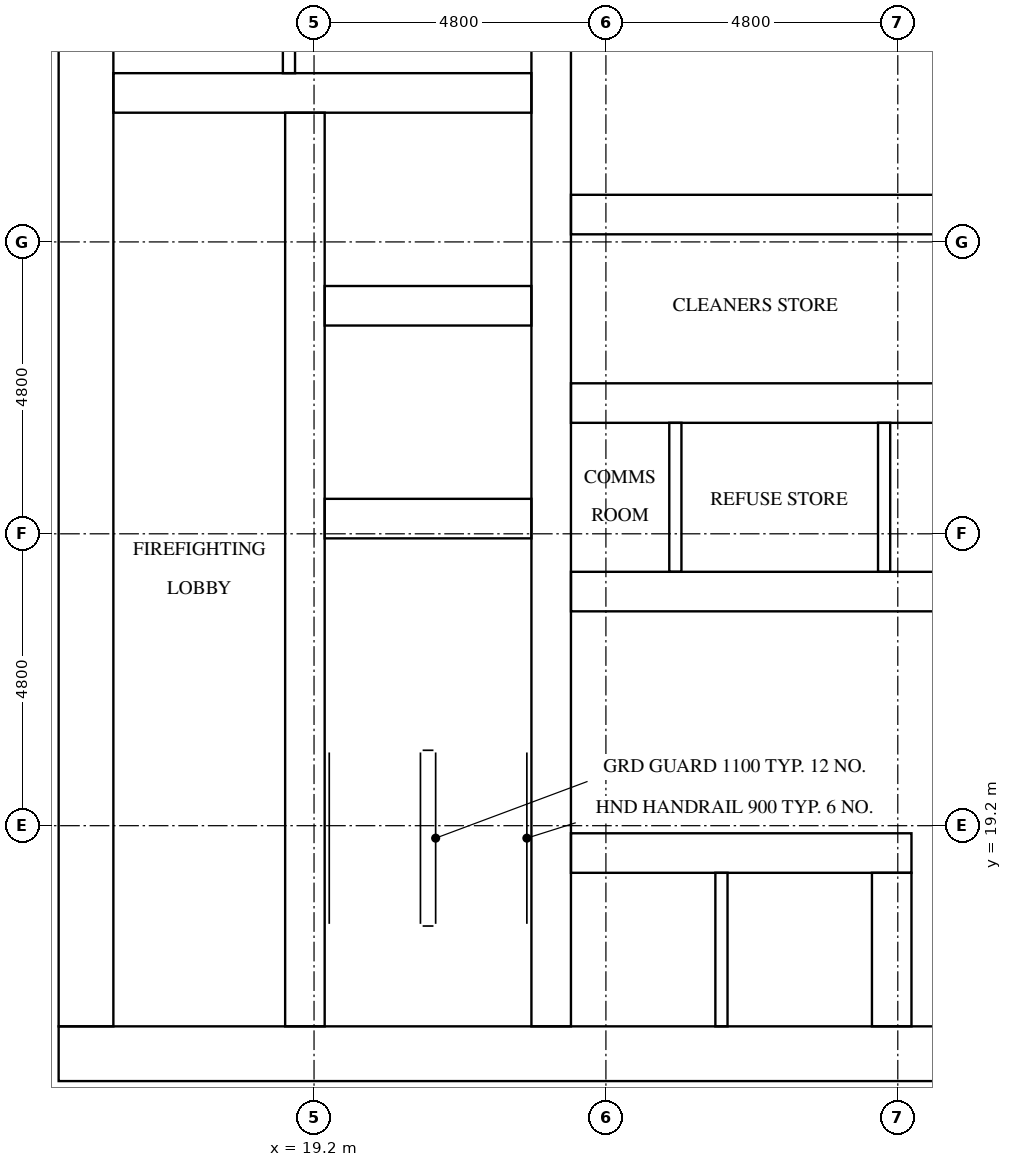
"""IFC4 building model, lengths in metres.
Left out: names, types, materials, properties, quantities, classifications, styles, units other than length and angle.
Written with IfcOpenShell. Run it as: python <this file> out.ifc"""

import sys

from ifc_helpers import new_model, si_unit, direction, frame, frame_2d, origin, place, context, subcontext, project, spatial, rectangle, extrude, element, fill, save


model = new_model("IFC4")
c1 = context("Model", 3, precision=1e-05, world=origin(), true_north=direction((0.0, 1.0)))
c2 = subcontext(c1, "Body", "Model", "MODEL_VIEW")
j1 = project(units=[si_unit("LENGTHUNIT", "METRE"), si_unit("PLANEANGLEUNIT", "RADIAN")], contexts=[c1])
p1 = place(None, origin())
s1 = spatial("IfcSite", under=j1, at=p1, CompositionType="ELEMENT")
p2 = place(p1, origin())
s2 = spatial("IfcBuilding", under=s1, at=p2, CompositionType="ELEMENT")
p3 = place(p2, frame((0.0, 0.0, 89.2)))
s3 = spatial("IfcBuildingStorey", under=s2, at=p3, CompositionType="ELEMENT", Elevation=89.2)
p4 = place(p3, frame((15.0, 15.45, 0.0), z_axis=(0.0, 0.0, 1.0), x_axis=(1.0, 0.0, 0.0)))
e1 = element("IfcWall", 1, at=p4, inside=s3, PredefinedType="SHEAR", context=c2, shape_type="SweptSolid", body=[
    extrude(rectangle(XDim=32.4, YDim=0.9, at=frame_2d((16.2, 0.0))), origin(), (0.0, 0.0, 1.0), 3.2),
])
p5 = place(p4, frame((15.3, 0.0, 0.0)))
e2 = element("IfcOpeningElement", 2, at=p5, cuts=e1, PredefinedType="OPENING", context=c2, shape_type="SweptSolid", body=[
    extrude(rectangle(XDim=1.8, YDim=2.1, at=frame_2d((0.9, 1.05))), frame((0.0, 0.46, 0.0), z_axis=(0.0, -1.0, 0.0), x_axis=(1.0, 0.0, 0.0)), (0.0, 0.0, 1.0), 0.92),
])
p6 = place(p3, frame((15.45, 15.9, 0.0), z_axis=(0.0, 0.0, 1.0), x_axis=(0.0, 1.0, 0.0)))
e3 = element("IfcWall", 3, at=p6, inside=s3, PredefinedType="SHEAR", context=c2, shape_type="SweptSolid", body=[
    extrude(rectangle(XDim=21.0, YDim=0.9, at=frame_2d((10.5, 0.0))), origin(), (0.0, 0.0, 1.0), 3.2),
])
p7 = place(p6, frame((4.86, 0.0, 0.0)))
e4 = element("IfcOpeningElement", 4, at=p7, cuts=e3, PredefinedType="OPENING", context=c2, shape_type="SweptSolid", body=[
    extrude(rectangle(XDim=1.2, YDim=2.1, at=frame_2d((0.6, 1.05))), frame((0.0, 0.46, 0.0), z_axis=(0.0, -1.0, 0.0), x_axis=(1.0, 0.0, 0.0)), (0.0, 0.0, 1.0), 0.92),
])
p8 = place(p3, frame((19.05, 15.9, 0.0), z_axis=(0.0, 0.0, 1.0), x_axis=(0.0, 1.0, 0.0)))
e5 = element("IfcWall", 5, at=p8, inside=s3, PredefinedType="SHEAR", context=c2, shape_type="SweptSolid", body=[
    extrude(rectangle(XDim=15.025, YDim=0.65, at=frame_2d((7.513, 0.0))), origin(), (0.0, 0.0, 1.0), 3.2),
])
p9 = place(p8, frame((9.55, 0.0, 0.0)))
e6 = element("IfcOpeningElement", 6, at=p9, cuts=e5, PredefinedType="OPENING", context=c2, shape_type="SweptSolid", body=[
    extrude(rectangle(XDim=1.1, YDim=2.1, at=frame_2d((0.55, 1.05))), frame((0.0, 0.335, 0.0), z_axis=(0.0, -1.0, 0.0), x_axis=(1.0, 0.0, 0.0)), (0.0, 0.0, 1.0), 0.67),
])
p10 = place(p8, frame((13.05, 0.0, 0.0)))
e7 = element("IfcOpeningElement", 7, at=p10, cuts=e5, PredefinedType="OPENING", context=c2, shape_type="SweptSolid", body=[
    extrude(rectangle(XDim=1.1, YDim=2.1, at=frame_2d((0.55, 1.05))), frame((0.0, 0.335, 0.0), z_axis=(0.0, -1.0, 0.0), x_axis=(1.0, 0.0, 0.0)), (0.0, 0.0, 1.0), 0.67),
])
p11 = place(p8, frame((0.3, 0.0, 0.0)))
e8 = element("IfcOpeningElement", 8, at=p11, cuts=e5, PredefinedType="OPENING", context=c2, shape_type="SweptSolid", body=[
    extrude(rectangle(XDim=1.2, YDim=2.1, at=frame_2d((0.6, 1.05))), frame((0.0, 0.335, 0.0), z_axis=(0.0, -1.0, 0.0), x_axis=(1.0, 0.0, 0.0)), (0.0, 0.0, 1.0), 0.67),
])
p12 = place(p3, frame((23.1, 15.9, 0.0), z_axis=(0.0, 0.0, 1.0), x_axis=(0.0, 1.0, 0.0)))
e9 = element("IfcWall", 9, at=p12, inside=s3, PredefinedType="SHEAR", context=c2, shape_type="SweptSolid", body=[
    extrude(rectangle(XDim=21.0, YDim=0.65, at=frame_2d((10.5, 0.0))), origin(), (0.0, 0.0, 1.0), 3.2),
])
for number, where, z_axis, x_axis in (
    (10, (19.375, 24.25, 0.0), (0.0, 0.0, 1.0), (1.0, 0.0, 0.0)),
    (11, (19.375, 27.75, 0.0), (0.0, 0.0, 1.0), (1.0, 0.0, 0.0)),
):
    element("IfcWall", number, at=place(p3, frame(where, z_axis=z_axis, x_axis=x_axis)), inside=s3, PredefinedType="SHEAR", context=c2, shape_type="SweptSolid", body=[
        extrude(rectangle(XDim=3.4, YDim=0.65, at=frame_2d((1.7, 0.0))), origin(), (0.0, 0.0, 1.0), 3.2),
    ])
p13 = place(p3, frame((15.9, 31.25, 0.0), z_axis=(0.0, 0.0, 1.0), x_axis=(1.0, 0.0, 0.0)))
e12 = element("IfcWall", 12, at=p13, inside=s3, PredefinedType="SHEAR", context=c2, shape_type="SweptSolid", body=[
    extrude(rectangle(XDim=6.875, YDim=0.65, at=frame_2d((3.438, 0.0))), origin(), (0.0, 0.0, 1.0), 3.2),
])
p14 = place(p3, frame((23.425, 18.75, 0.0), z_axis=(0.0, 0.0, 1.0), x_axis=(1.0, 0.0, 0.0)))
e13 = element("IfcWall", 13, at=p14, inside=s3, PredefinedType="SHEAR", context=c2, shape_type="SweptSolid", body=[
    extrude(rectangle(XDim=5.6, YDim=0.65, at=frame_2d((2.8, 0.0))), origin(), (0.0, 0.0, 1.0), 3.2),
])
p15 = place(p14, frame((0.637, 0.0, 0.0)))
e14 = element("IfcOpeningElement", 14, at=p15, cuts=e13, PredefinedType="OPENING", context=c2, shape_type="SweptSolid", body=[
    extrude(rectangle(XDim=1.1, YDim=2.1, at=frame_2d((0.55, 1.05))), frame((0.0, 0.335, 0.0), z_axis=(0.0, -1.0, 0.0), x_axis=(1.0, 0.0, 0.0)), (0.0, 0.0, 1.0), 0.67),
])
p16 = place(p14, frame((3.212, 0.0, 0.0)))
e15 = element("IfcOpeningElement", 15, at=p16, cuts=e13, PredefinedType="OPENING", context=c2, shape_type="SweptSolid", body=[
    extrude(rectangle(XDim=1.1, YDim=2.1, at=frame_2d((0.55, 1.05))), frame((0.0, 0.335, 0.0), z_axis=(0.0, -1.0, 0.0), x_axis=(1.0, 0.0, 0.0)), (0.0, 0.0, 1.0), 0.67),
])
p17 = place(p3, frame((23.425, 23.05, 0.0), z_axis=(0.0, 0.0, 1.0), x_axis=(1.0, 0.0, 0.0)))
e16 = element("IfcWall", 16, at=p17, inside=s3, PredefinedType="SHEAR", context=c2, shape_type="SweptSolid", body=[
    extrude(rectangle(XDim=15.55, YDim=0.65, at=frame_2d((7.775, 0.0))), origin(), (0.0, 0.0, 1.0), 3.2),
])
p18 = place(p17, frame((0.309, 0.0, 0.0)))
e17 = element("IfcOpeningElement", 17, at=p18, cuts=e16, PredefinedType="OPENING", context=c2, shape_type="SweptSolid", body=[
    extrude(rectangle(XDim=1.0, YDim=2.1, at=frame_2d((0.5, 1.05))), frame((0.0, 0.335, 0.0), z_axis=(0.0, -1.0, 0.0), x_axis=(1.0, 0.0, 0.0)), (0.0, 0.0, 1.0), 0.67),
])
p19 = place(p17, frame((2.934, 0.0, 0.0)))
e18 = element("IfcOpeningElement", 18, at=p19, cuts=e16, PredefinedType="OPENING", context=c2, shape_type="SweptSolid", body=[
    extrude(rectangle(XDim=1.0, YDim=2.1, at=frame_2d((0.5, 1.05))), frame((0.0, 0.335, 0.0), z_axis=(0.0, -1.0, 0.0), x_axis=(1.0, 0.0, 0.0)), (0.0, 0.0, 1.0), 0.67),
])
p20 = place(p17, frame((10.809, 0.0, 0.0)))
e19 = element("IfcOpeningElement", 19, at=p20, cuts=e16, PredefinedType="OPENING", context=c2, shape_type="SweptSolid", body=[
    extrude(rectangle(XDim=1.0, YDim=2.1, at=frame_2d((0.5, 1.05))), frame((0.0, 0.335, 0.0), z_axis=(0.0, -1.0, 0.0), x_axis=(1.0, 0.0, 0.0)), (0.0, 0.0, 1.0), 0.67),
])
p21 = place(p17, frame((13.434, 0.0, 0.0)))
e20 = element("IfcOpeningElement", 20, at=p21, cuts=e16, PredefinedType="OPENING", context=c2, shape_type="SweptSolid", body=[
    extrude(rectangle(XDim=1.0, YDim=2.1, at=frame_2d((0.5, 1.05))), frame((0.0, 0.335, 0.0), z_axis=(0.0, -1.0, 0.0), x_axis=(1.0, 0.0, 0.0)), (0.0, 0.0, 1.0), 0.67),
])
p22 = place(p3, frame((23.425, 26.15, 0.0), z_axis=(0.0, 0.0, 1.0), x_axis=(1.0, 0.0, 0.0)))
e21 = element("IfcWall", 21, at=p22, inside=s3, PredefinedType="SHEAR", context=c2, shape_type="SweptSolid", body=[
    extrude(rectangle(XDim=15.55, YDim=0.65, at=frame_2d((7.775, 0.0))), origin(), (0.0, 0.0, 1.0), 3.2),
])
p23 = place(p3, frame((23.425, 29.25, 0.0), z_axis=(0.0, 0.0, 1.0), x_axis=(1.0, 0.0, 0.0)))
e22 = element("IfcWall", 22, at=p23, inside=s3, PredefinedType="SHEAR", context=c2, shape_type="SweptSolid", body=[
    extrude(rectangle(XDim=15.55, YDim=0.65, at=frame_2d((7.775, 0.0))), origin(), (0.0, 0.0, 1.0), 3.2),
])
p24 = place(p23, frame((2.508, 0.0, 0.0)))
e23 = element("IfcOpeningElement", 23, at=p24, cuts=e22, PredefinedType="OPENING", context=c2, shape_type="SweptSolid", body=[
    extrude(rectangle(XDim=1.0, YDim=2.1, at=frame_2d((0.5, 1.05))), frame((0.0, 0.335, 0.0), z_axis=(0.0, -1.0, 0.0), x_axis=(1.0, 0.0, 0.0)), (0.0, 0.0, 1.0), 0.67),
])
p25 = place(p23, frame((7.275, 0.0, 0.0)))
e24 = element("IfcOpeningElement", 24, at=p25, cuts=e22, PredefinedType="OPENING", context=c2, shape_type="SweptSolid", body=[
    extrude(rectangle(XDim=1.0, YDim=2.1, at=frame_2d((0.5, 1.05))), frame((0.0, 0.335, 0.0), z_axis=(0.0, -1.0, 0.0), x_axis=(1.0, 0.0, 0.0)), (0.0, 0.0, 1.0), 0.67),
])
p26 = place(p23, frame((12.042, 0.0, 0.0)))
e25 = element("IfcOpeningElement", 25, at=p26, cuts=e22, PredefinedType="OPENING", context=c2, shape_type="SweptSolid", body=[
    extrude(rectangle(XDim=1.0, YDim=2.1, at=frame_2d((0.5, 1.05))), frame((0.0, 0.335, 0.0), z_axis=(0.0, -1.0, 0.0), x_axis=(1.0, 0.0, 0.0)), (0.0, 0.0, 1.0), 0.67),
])
p27 = place(p3, frame((28.7, 15.9, 0.0), z_axis=(0.0, 0.0, 1.0), x_axis=(0.0, 1.0, 0.0)))
e26 = element("IfcWall", 26, at=p27, inside=s3, PredefinedType="SHEAR", context=c2, shape_type="SweptSolid", body=[
    extrude(rectangle(XDim=2.525, YDim=0.65, at=frame_2d((1.263, 0.0))), origin(), (0.0, 0.0, 1.0), 3.2),
])
p28 = place(p3, frame((28.575, 23.375, 0.0), z_axis=(0.0, 0.0, 1.0), x_axis=(0.0, 1.0, 0.0)))
e27 = element("IfcWall", 27, at=p28, inside=s3, PredefinedType="SOLIDWALL", context=c2, shape_type="SweptSolid", body=[
    extrude(rectangle(XDim=2.45, YDim=0.2, at=frame_2d((1.225, 0.0))), origin(), (0.0, 0.0, 1.0), 3.2),
])
p29 = place(p3, frame((25.9, 15.9, 0.0), z_axis=(0.0, 0.0, 1.0), x_axis=(0.0, 1.0, 0.0)))
e28 = element("IfcWall", 28, at=p29, inside=s3, PredefinedType="SOLIDWALL", context=c2, shape_type="SweptSolid", body=[
    extrude(rectangle(XDim=2.525, YDim=0.2, at=frame_2d((1.263, 0.0))), origin(), (0.0, 0.0, 1.0), 3.2),
])
p30 = place(p3, frame((18.788, 31.575, 0.0), z_axis=(0.0, 0.0, 1.0), x_axis=(0.0, 1.0, 0.0)))
e29 = element("IfcWall", 29, at=p30, inside=s3, PredefinedType="PARTITIONING", context=c2, shape_type="SweptSolid", body=[
    extrude(rectangle(XDim=5.325, YDim=0.2, at=frame_2d((2.663, 0.0))), origin(), (0.0, 0.0, 1.0), 3.2),
])
p31 = place(p3, frame((25.142, 23.375, 0.0), z_axis=(0.0, 0.0, 1.0), x_axis=(0.0, 1.0, 0.0)))
e30 = element("IfcWall", 30, at=p31, inside=s3, PredefinedType="PARTITIONING", context=c2, shape_type="SweptSolid", body=[
    extrude(rectangle(XDim=2.45, YDim=0.2, at=frame_2d((1.225, 0.0))), origin(), (0.0, 0.0, 1.0), 3.2),
])
p32 = place(p15, origin())
e31 = element("IfcDoor", 31, at=p32, inside=s3, OperationType="DOUBLE_DOOR_SLIDING", PredefinedType="DOOR", context=c2, shape_type="SweptSolid", body=[
    extrude(rectangle(XDim=1.1, YDim=2.1, at=frame_2d((0.55, 1.05))), frame((0.0, 0.025, 0.0), z_axis=(0.0, -1.0, 0.0), x_axis=(1.0, 0.0, 0.0)), (0.0, 0.0, 1.0), 0.05),
])
fill(e14, e31)
p33 = place(p16, origin())
e32 = element("IfcDoor", 32, at=p33, inside=s3, OperationType="DOUBLE_DOOR_SLIDING", PredefinedType="DOOR", context=c2, shape_type="SweptSolid", body=[
    extrude(rectangle(XDim=1.1, YDim=2.1, at=frame_2d((0.55, 1.05))), frame((0.0, 0.025, 0.0), z_axis=(0.0, -1.0, 0.0), x_axis=(1.0, 0.0, 0.0)), (0.0, 0.0, 1.0), 0.05),
])
fill(e15, e32)
p34 = place(p9, origin())
e33 = element("IfcDoor", 33, at=p34, inside=s3, OperationType="DOUBLE_DOOR_SLIDING", PredefinedType="DOOR", context=c2, shape_type="SweptSolid", body=[
    extrude(rectangle(XDim=1.1, YDim=2.1, at=frame_2d((0.55, 1.05))), frame((0.0, 0.025, 0.0), z_axis=(0.0, -1.0, 0.0), x_axis=(1.0, 0.0, 0.0)), (0.0, 0.0, 1.0), 0.05),
])
fill(e6, e33)
p35 = place(p10, origin())
e34 = element("IfcDoor", 34, at=p35, inside=s3, OperationType="DOUBLE_DOOR_SLIDING", PredefinedType="DOOR", context=c2, shape_type="SweptSolid", body=[
    extrude(rectangle(XDim=1.1, YDim=2.1, at=frame_2d((0.55, 1.05))), frame((0.0, 0.025, 0.0), z_axis=(0.0, -1.0, 0.0), x_axis=(1.0, 0.0, 0.0)), (0.0, 0.0, 1.0), 0.05),
])
fill(e7, e34)
p36 = place(p11, frame((1.2, 0.0, 0.0), z_axis=(0.0, 0.0, 1.0), x_axis=(-1.0, 0.0, 0.0)))
e35 = element("IfcDoor", 35, at=p36, inside=s3, OperationType="SINGLE_SWING_RIGHT", PredefinedType="DOOR", context=c2, shape_type="SweptSolid", body=[
    extrude(rectangle(XDim=1.2, YDim=2.1, at=frame_2d((0.6, 1.05))), frame((0.0, 0.025, 0.0), z_axis=(0.0, -1.0, 0.0), x_axis=(1.0, 0.0, 0.0)), (0.0, 0.0, 1.0), 0.05),
])
fill(e8, e35)
p37 = place(p7, frame((1.2, 0.0, 0.0), z_axis=(0.0, 0.0, 1.0), x_axis=(-1.0, 0.0, 0.0)))
e36 = element("IfcDoor", 36, at=p37, inside=s3, OperationType="SINGLE_SWING_LEFT", PredefinedType="DOOR", context=c2, shape_type="SweptSolid", body=[
    extrude(rectangle(XDim=1.2, YDim=2.1, at=frame_2d((0.6, 1.05))), frame((0.0, 0.025, 0.0), z_axis=(0.0, -1.0, 0.0), x_axis=(1.0, 0.0, 0.0)), (0.0, 0.0, 1.0), 0.05),
])
fill(e4, e36)
p38 = place(p18, frame((1.0, 0.0, 0.0), z_axis=(0.0, 0.0, 1.0), x_axis=(-1.0, 0.0, 0.0)))
e37 = element("IfcDoor", 37, at=p38, inside=s3, OperationType="SINGLE_SWING_LEFT", PredefinedType="DOOR", context=c2, shape_type="SweptSolid", body=[
    extrude(rectangle(XDim=1.0, YDim=2.1, at=frame_2d((0.5, 1.05))), frame((0.0, 0.025, 0.0), z_axis=(0.0, -1.0, 0.0), x_axis=(1.0, 0.0, 0.0)), (0.0, 0.0, 1.0), 0.05),
])
fill(e17, e37)
p39 = place(p19, frame((1.0, 0.0, 0.0), z_axis=(0.0, 0.0, 1.0), x_axis=(-1.0, 0.0, 0.0)))
e38 = element("IfcDoor", 38, at=p39, inside=s3, OperationType="SINGLE_SWING_RIGHT", PredefinedType="DOOR", context=c2, shape_type="SweptSolid", body=[
    extrude(rectangle(XDim=1.0, YDim=2.1, at=frame_2d((0.5, 1.05))), frame((0.0, 0.025, 0.0), z_axis=(0.0, -1.0, 0.0), x_axis=(1.0, 0.0, 0.0)), (0.0, 0.0, 1.0), 0.05),
])
fill(e18, e38)
p40 = place(p24, origin())
e39 = element("IfcDoor", 39, at=p40, inside=s3, OperationType="SINGLE_SWING_LEFT", PredefinedType="DOOR", context=c2, shape_type="SweptSolid", body=[
    extrude(rectangle(XDim=1.0, YDim=2.1, at=frame_2d((0.5, 1.05))), frame((0.0, 0.025, 0.0), z_axis=(0.0, -1.0, 0.0), x_axis=(1.0, 0.0, 0.0)), (0.0, 0.0, 1.0), 0.05),
])
fill(e23, e39)
save(model, sys.argv[1])
